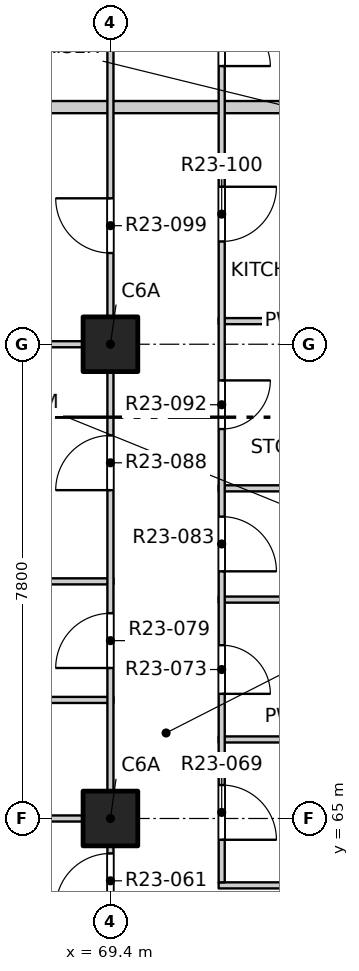
"""IFC4 building model, lengths in metres.
Left out: names, types, materials, properties, quantities, classifications, styles, units other than length and angle.
Written with IfcOpenShell. Run it as: python <this file> out.ifc"""

import sys

from ifc_helpers import new_model, si_unit, direction, frame, frame_2d, origin, origin_2d, place, context, subcontext, project, spatial, rectangle, extrude, element, fill, save


model = new_model("IFC4")
c1 = context("Model", 3, precision=1e-05, world=origin(), true_north=direction((0.0, 1.0)))
c2 = subcontext(c1, "Body", "Model", "MODEL_VIEW")
j1 = project(units=[si_unit("LENGTHUNIT", "METRE"), si_unit("PLANEANGLEUNIT", "RADIAN")], contexts=[c1])
p1 = place(None, origin())
s1 = spatial("IfcSite", under=j1, at=p1, CompositionType="ELEMENT")
p2 = place(p1, origin())
s2 = spatial("IfcBuilding", under=s1, at=p2, CompositionType="ELEMENT")
p3 = place(p2, frame((0.0, 0.0, 238.1)))
s3 = spatial("IfcBuildingStorey", under=s2, at=p3, CompositionType="ELEMENT", Elevation=238.1)
for number, where, z_axis, x_axis in (
    (1, (69.4, 65.0, -0.25), (0.0, 0.0, 1.0), (1.0, 0.0, 0.0)),
    (2, (69.4, 72.8, -0.25), (0.0, 0.0, 1.0), (1.0, 0.0, 0.0)),
):
    element("IfcColumn", number, at=place(p3, frame(where, z_axis=z_axis, x_axis=x_axis)), inside=s3, PredefinedType="COLUMN", context=c2, shape_type="SweptSolid", body=[
        extrude(rectangle(XDim=0.9, YDim=0.9, at=origin_2d()), origin(), (0.0, 0.0, 1.0), 3.35),
    ])
p4 = place(p3, frame((71.18, 63.9, 0.0), z_axis=(0.0, 0.0, 1.0), x_axis=(1.0, 0.0, 0.0)))
e3 = element("IfcWall", 3, at=p4, inside=s3, PredefinedType="PARTITIONING", context=c2, shape_type="SweptSolid", body=[
    extrude(rectangle(XDim=2.22, YDim=0.1, at=frame_2d((1.11, 0.0))), origin(), (0.0, 0.0, 1.0), 3.1),
])
p5 = place(p3, frame((61.9, 65.0, 0.0), z_axis=(0.0, 0.0, 1.0), x_axis=(1.0, 0.0, 0.0)))
e4 = element("IfcWall", 4, at=p5, inside=s3, PredefinedType="PARTITIONING", context=c2, shape_type="SweptSolid", body=[
    extrude(rectangle(XDim=7.55, YDim=0.1, at=frame_2d((3.775, 0.0))), origin(), (0.0, 0.0, 1.0), 3.1),
])
p6 = place(p3, frame((71.18, 66.3, 0.0), z_axis=(0.0, 0.0, 1.0), x_axis=(1.0, 0.0, 0.0)))
e5 = element("IfcWall", 5, at=p6, inside=s3, PredefinedType="PARTITIONING", context=c2, shape_type="SweptSolid", body=[
    extrude(rectangle(XDim=2.22, YDim=0.1, at=frame_2d((1.11, 0.0))), origin(), (0.0, 0.0, 1.0), 3.1),
])
p7 = place(p3, frame((65.75, 66.95, 0.0), z_axis=(0.0, 0.0, 1.0), x_axis=(1.0, 0.0, 0.0)))
e6 = element("IfcWall", 6, at=p7, inside=s3, PredefinedType="PARTITIONING", context=c2, shape_type="SweptSolid", body=[
    extrude(rectangle(XDim=3.7, YDim=0.1, at=frame_2d((1.85, 0.0))), origin(), (0.0, 0.0, 1.0), 3.1),
])
p8 = place(p3, frame((71.18, 68.6, 0.0), z_axis=(0.0, 0.0, 1.0), x_axis=(1.0, 0.0, 0.0)))
e7 = element("IfcWall", 7, at=p8, inside=s3, PredefinedType="PARTITIONING", context=c2, shape_type="SweptSolid", body=[
    extrude(rectangle(XDim=2.22, YDim=0.1, at=frame_2d((1.11, 0.0))), origin(), (0.0, 0.0, 1.0), 3.1),
])
p9 = place(p3, frame((61.9, 68.9, 0.0), z_axis=(0.0, 0.0, 1.0), x_axis=(1.0, 0.0, 0.0)))
e8 = element("IfcWall", 8, at=p9, inside=s3, PredefinedType="PARTITIONING", context=c2, shape_type="SweptSolid", body=[
    extrude(rectangle(XDim=7.55, YDim=0.1, at=frame_2d((3.775, 0.0))), origin(), (0.0, 0.0, 1.0), 3.1),
])
p10 = place(p3, frame((71.18, 70.43, 0.0), z_axis=(0.0, 0.0, 1.0), x_axis=(1.0, 0.0, 0.0)))
e9 = element("IfcWall", 9, at=p10, inside=s3, PredefinedType="PARTITIONING", context=c2, shape_type="SweptSolid", body=[
    extrude(rectangle(XDim=2.22, YDim=0.1, at=frame_2d((1.11, 0.0))), origin(), (0.0, 0.0, 1.0), 3.1),
])
p11 = place(p3, frame((61.9, 72.8, 0.0), z_axis=(0.0, 0.0, 1.0), x_axis=(1.0, 0.0, 0.0)))
e10 = element("IfcWall", 10, at=p11, inside=s3, PredefinedType="PARTITIONING", context=c2, shape_type="SweptSolid", body=[
    extrude(rectangle(XDim=7.55, YDim=0.1, at=frame_2d((3.775, 0.0))), origin(), (0.0, 0.0, 1.0), 3.1),
])
p12 = place(p3, frame((71.18, 73.18, 0.0), z_axis=(0.0, 0.0, 1.0), x_axis=(1.0, 0.0, 0.0)))
e11 = element("IfcWall", 11, at=p12, inside=s3, PredefinedType="PARTITIONING", context=c2, shape_type="SweptSolid", body=[
    extrude(rectangle(XDim=2.22, YDim=0.1, at=frame_2d((1.11, 0.0))), origin(), (0.0, 0.0, 1.0), 3.1),
])
p13 = place(p3, frame((61.9, 76.7, 0.0), z_axis=(0.0, 0.0, 1.0), x_axis=(1.0, 0.0, 0.0)))
e12 = element("IfcWall", 12, at=p13, inside=s3, PredefinedType="PARTITIONING", context=c2, shape_type="SweptSolid", body=[
    extrude(rectangle(XDim=11.5, YDim=0.2, at=frame_2d((5.75, 0.0))), origin(), (0.0, 0.0, 1.0), 3.1),
])
p14 = place(p3, frame((69.4, 41.9, 0.0), z_axis=(0.0, 0.0, 1.0), x_axis=(0.0, 1.0, 0.0)))
e13 = element("IfcWall", 13, at=p14, inside=s3, PredefinedType="PARTITIONING", context=c2, shape_type="SweptSolid", body=[
    extrude(rectangle(XDim=46.2, YDim=0.1, at=frame_2d((23.1, 0.0))), origin(), (0.0, 0.0, 1.0), 3.1),
])
p15 = place(p14, frame((1.2, 0.0, 0.0)))
e14 = element("IfcOpeningElement", 14, at=p15, cuts=e13, PredefinedType="OPENING", context=c2, shape_type="SweptSolid", body=[
    extrude(rectangle(XDim=0.9, YDim=2.1, at=frame_2d((0.45, 1.05))), frame((0.0, 0.06, 0.0), z_axis=(0.0, -1.0, 0.0), x_axis=(1.0, 0.0, 0.0)), (0.0, 0.0, 1.0), 0.12),
])
p16 = place(p14, frame((6.025, 0.0, 0.0)))
e15 = element("IfcOpeningElement", 15, at=p16, cuts=e13, PredefinedType="OPENING", context=c2, shape_type="SweptSolid", body=[
    extrude(rectangle(XDim=0.9, YDim=2.1, at=frame_2d((0.45, 1.05))), frame((0.0, 0.06, 0.0), z_axis=(0.0, -1.0, 0.0), x_axis=(1.0, 0.0, 0.0)), (0.0, 0.0, 1.0), 0.12),
])
p17 = place(p14, frame((9.975, 0.0, 0.0)))
e16 = element("IfcOpeningElement", 16, at=p17, cuts=e13, PredefinedType="OPENING", context=c2, shape_type="SweptSolid", body=[
    extrude(rectangle(XDim=0.9, YDim=2.1, at=frame_2d((0.45, 1.05))), frame((0.0, 0.06, 0.0), z_axis=(0.0, -1.0, 0.0), x_axis=(1.0, 0.0, 0.0)), (0.0, 0.0, 1.0), 0.12),
])
p18 = place(p14, frame((12.9, 0.0, 0.0)))
e17 = element("IfcOpeningElement", 17, at=p18, cuts=e13, PredefinedType="OPENING", context=c2, shape_type="SweptSolid", body=[
    extrude(rectangle(XDim=0.9, YDim=2.1, at=frame_2d((0.45, 1.05))), frame((0.0, 0.06, 0.0), z_axis=(0.0, -1.0, 0.0), x_axis=(1.0, 0.0, 0.0)), (0.0, 0.0, 1.0), 0.12),
])
p19 = place(p14, frame((17.775, 0.0, 0.0)))
e18 = element("IfcOpeningElement", 18, at=p19, cuts=e13, PredefinedType="OPENING", context=c2, shape_type="SweptSolid", body=[
    extrude(rectangle(XDim=0.9, YDim=2.1, at=frame_2d((0.45, 1.05))), frame((0.0, 0.06, 0.0), z_axis=(0.0, -1.0, 0.0), x_axis=(1.0, 0.0, 0.0)), (0.0, 0.0, 1.0), 0.12),
])
p20 = place(p14, frame((21.625, 0.0, 0.0)))
e19 = element("IfcOpeningElement", 19, at=p20, cuts=e13, PredefinedType="OPENING", context=c2, shape_type="SweptSolid", body=[
    extrude(rectangle(XDim=0.9, YDim=2.1, at=frame_2d((0.45, 1.05))), frame((0.0, 0.06, 0.0), z_axis=(0.0, -1.0, 0.0), x_axis=(1.0, 0.0, 0.0)), (0.0, 0.0, 1.0), 0.12),
])
p21 = place(p14, frame((25.575, 0.0, 0.0)))
e20 = element("IfcOpeningElement", 20, at=p21, cuts=e13, PredefinedType="OPENING", context=c2, shape_type="SweptSolid", body=[
    extrude(rectangle(XDim=0.9, YDim=2.1, at=frame_2d((0.45, 1.05))), frame((0.0, 0.06, 0.0), z_axis=(0.0, -1.0, 0.0), x_axis=(1.0, 0.0, 0.0)), (0.0, 0.0, 1.0), 0.12),
])
p22 = place(p14, frame((28.5, 0.0, 0.0)))
e21 = element("IfcOpeningElement", 21, at=p22, cuts=e13, PredefinedType="OPENING", context=c2, shape_type="SweptSolid", body=[
    extrude(rectangle(XDim=0.9, YDim=2.1, at=frame_2d((0.45, 1.05))), frame((0.0, 0.06, 0.0), z_axis=(0.0, -1.0, 0.0), x_axis=(1.0, 0.0, 0.0)), (0.0, 0.0, 1.0), 0.12),
])
p23 = place(p14, frame((32.4, 0.0, 0.0)))
e22 = element("IfcOpeningElement", 22, at=p23, cuts=e13, PredefinedType="OPENING", context=c2, shape_type="SweptSolid", body=[
    extrude(rectangle(XDim=0.9, YDim=2.1, at=frame_2d((0.45, 1.05))), frame((0.0, 0.06, 0.0), z_axis=(0.0, -1.0, 0.0), x_axis=(1.0, 0.0, 0.0)), (0.0, 0.0, 1.0), 0.12),
])
p24 = place(p14, frame((36.3, 0.0, 0.0)))
e23 = element("IfcOpeningElement", 23, at=p24, cuts=e13, PredefinedType="OPENING", context=c2, shape_type="SweptSolid", body=[
    extrude(rectangle(XDim=0.9, YDim=2.1, at=frame_2d((0.45, 1.05))), frame((0.0, 0.06, 0.0), z_axis=(0.0, -1.0, 0.0), x_axis=(1.0, 0.0, 0.0)), (0.0, 0.0, 1.0), 0.12),
])
p25 = place(p14, frame((40.2, 0.0, 0.0)))
e24 = element("IfcOpeningElement", 24, at=p25, cuts=e13, PredefinedType="OPENING", context=c2, shape_type="SweptSolid", body=[
    extrude(rectangle(XDim=0.9, YDim=2.1, at=frame_2d((0.45, 1.05))), frame((0.0, 0.06, 0.0), z_axis=(0.0, -1.0, 0.0), x_axis=(1.0, 0.0, 0.0)), (0.0, 0.0, 1.0), 0.12),
])
p26 = place(p14, frame((44.1, 0.0, 0.0)))
e25 = element("IfcOpeningElement", 25, at=p26, cuts=e13, PredefinedType="OPENING", context=c2, shape_type="SweptSolid", body=[
    extrude(rectangle(XDim=0.9, YDim=2.1, at=frame_2d((0.45, 1.05))), frame((0.0, 0.06, 0.0), z_axis=(0.0, -1.0, 0.0), x_axis=(1.0, 0.0, 0.0)), (0.0, 0.0, 1.0), 0.12),
])
p27 = place(p3, frame((71.23, 63.95, 0.0), z_axis=(0.0, 0.0, 1.0), x_axis=(0.0, 1.0, 0.0)))
e26 = element("IfcWall", 26, at=p27, inside=s3, PredefinedType="PARTITIONING", context=c2, shape_type="SweptSolid", body=[
    extrude(rectangle(XDim=17.85, YDim=0.1, at=frame_2d((8.925, 0.0))), origin(), (0.0, 0.0, 1.0), 3.1),
])
p28 = place(p27, frame((0.7, 0.0, 0.0)))
e27 = element("IfcOpeningElement", 27, at=p28, cuts=e26, PredefinedType="OPENING", context=c2, shape_type="SweptSolid", body=[
    extrude(rectangle(XDim=0.9, YDim=2.1, at=frame_2d((0.45, 1.05))), frame((0.0, 0.06, 0.0), z_axis=(0.0, -1.0, 0.0), x_axis=(1.0, 0.0, 0.0)), (0.0, 0.0, 1.0), 0.12),
])
p29 = place(p27, frame((3.1, 0.0, 0.0)))
e28 = element("IfcOpeningElement", 28, at=p29, cuts=e26, PredefinedType="OPENING", context=c2, shape_type="SweptSolid", body=[
    extrude(rectangle(XDim=0.8, YDim=2.1, at=frame_2d((0.4, 1.05))), frame((0.0, 0.06, 0.0), z_axis=(0.0, -1.0, 0.0), x_axis=(1.0, 0.0, 0.0)), (0.0, 0.0, 1.0), 0.12),
])
p30 = place(p27, frame((5.115, 0.0, 0.0)))
e29 = element("IfcOpeningElement", 29, at=p30, cuts=e26, PredefinedType="OPENING", context=c2, shape_type="SweptSolid", body=[
    extrude(rectangle(XDim=0.9, YDim=2.1, at=frame_2d((0.45, 1.05))), frame((0.0, 0.06, 0.0), z_axis=(0.0, -1.0, 0.0), x_axis=(1.0, 0.0, 0.0)), (0.0, 0.0, 1.0), 0.12),
])
p31 = place(p27, frame((7.455, 0.0, 0.0)))
e30 = element("IfcOpeningElement", 30, at=p31, cuts=e26, PredefinedType="OPENING", context=c2, shape_type="SweptSolid", body=[
    extrude(rectangle(XDim=0.8, YDim=2.1, at=frame_2d((0.4, 1.05))), frame((0.0, 0.06, 0.0), z_axis=(0.0, -1.0, 0.0), x_axis=(1.0, 0.0, 0.0)), (0.0, 0.0, 1.0), 0.12),
])
p32 = place(p27, frame((10.54, 0.0, 0.0)))
e31 = element("IfcOpeningElement", 31, at=p32, cuts=e26, PredefinedType="OPENING", context=c2, shape_type="SweptSolid", body=[
    extrude(rectangle(XDim=0.9, YDim=2.1, at=frame_2d((0.45, 1.05))), frame((0.0, 0.06, 0.0), z_axis=(0.0, -1.0, 0.0), x_axis=(1.0, 0.0, 0.0)), (0.0, 0.0, 1.0), 0.12),
])
p33 = place(p27, frame((13.425, 0.0, 0.0)))
e32 = element("IfcOpeningElement", 32, at=p33, cuts=e26, PredefinedType="OPENING", context=c2, shape_type="SweptSolid", body=[
    extrude(rectangle(XDim=0.8, YDim=2.1, at=frame_2d((0.4, 1.05))), frame((0.0, 0.06, 0.0), z_axis=(0.0, -1.0, 0.0), x_axis=(1.0, 0.0, 0.0)), (0.0, 0.0, 1.0), 0.12),
])
p34 = place(p27, frame((15.95, 0.0, 0.0)))
e33 = element("IfcOpeningElement", 33, at=p34, cuts=e26, PredefinedType="OPENING", context=c2, shape_type="SweptSolid", body=[
    extrude(rectangle(XDim=0.9, YDim=2.1, at=frame_2d((0.45, 1.05))), frame((0.0, 0.06, 0.0), z_axis=(0.0, -1.0, 0.0), x_axis=(1.0, 0.0, 0.0)), (0.0, 0.0, 1.0), 0.12),
])
p35 = place(p20, origin())
e34 = element("IfcDoor", 34, at=p35, inside=s3, OperationType="SINGLE_SWING_LEFT", PredefinedType="DOOR", context=c2, shape_type="SweptSolid", body=[
    extrude(rectangle(XDim=0.9, YDim=2.1, at=frame_2d((0.45, 1.05))), frame((0.0, 0.025, 0.0), z_axis=(0.0, -1.0, 0.0), x_axis=(1.0, 0.0, 0.0)), (0.0, 0.0, 1.0), 0.05),
])
fill(e19, e34)
p36 = place(p28, origin())
e35 = element("IfcDoor", 35, at=p36, inside=s3, OperationType="SINGLE_SWING_RIGHT", PredefinedType="DOOR", context=c2, shape_type="SweptSolid", body=[
    extrude(rectangle(XDim=0.9, YDim=2.1, at=frame_2d((0.45, 1.05))), frame((0.0, 0.025, 0.0), z_axis=(0.0, -1.0, 0.0), x_axis=(1.0, 0.0, 0.0)), (0.0, 0.0, 1.0), 0.05),
])
fill(e27, e35)
p37 = place(p29, origin())
e36 = element("IfcDoor", 36, at=p37, inside=s3, OperationType="SINGLE_SWING_RIGHT", PredefinedType="DOOR", context=c2, shape_type="SweptSolid", body=[
    extrude(rectangle(XDim=0.8, YDim=2.1, at=frame_2d((0.4, 1.05))), frame((0.0, 0.025, 0.0), z_axis=(0.0, -1.0, 0.0), x_axis=(1.0, 0.0, 0.0)), (0.0, 0.0, 1.0), 0.05),
])
fill(e28, e36)
p38 = place(p21, origin())
e37 = element("IfcDoor", 37, at=p38, inside=s3, OperationType="SINGLE_SWING_LEFT", PredefinedType="DOOR", context=c2, shape_type="SweptSolid", body=[
    extrude(rectangle(XDim=0.9, YDim=2.1, at=frame_2d((0.45, 1.05))), frame((0.0, 0.025, 0.0), z_axis=(0.0, -1.0, 0.0), x_axis=(1.0, 0.0, 0.0)), (0.0, 0.0, 1.0), 0.05),
])
fill(e20, e37)
p39 = place(p30, origin())
e38 = element("IfcDoor", 38, at=p39, inside=s3, OperationType="SINGLE_SWING_RIGHT", PredefinedType="DOOR", context=c2, shape_type="SweptSolid", body=[
    extrude(rectangle(XDim=0.9, YDim=2.1, at=frame_2d((0.45, 1.05))), frame((0.0, 0.025, 0.0), z_axis=(0.0, -1.0, 0.0), x_axis=(1.0, 0.0, 0.0)), (0.0, 0.0, 1.0), 0.05),
])
fill(e29, e38)
p40 = place(p22, origin())
e39 = element("IfcDoor", 39, at=p40, inside=s3, OperationType="SINGLE_SWING_LEFT", PredefinedType="DOOR", context=c2, shape_type="SweptSolid", body=[
    extrude(rectangle(XDim=0.9, YDim=2.1, at=frame_2d((0.45, 1.05))), frame((0.0, 0.025, 0.0), z_axis=(0.0, -1.0, 0.0), x_axis=(1.0, 0.0, 0.0)), (0.0, 0.0, 1.0), 0.05),
])
fill(e21, e39)
p41 = place(p31, origin())
e40 = element("IfcDoor", 40, at=p41, inside=s3, OperationType="SINGLE_SWING_LEFT", PredefinedType="DOOR", context=c2, shape_type="SweptSolid", body=[
    extrude(rectangle(XDim=0.8, YDim=2.1, at=frame_2d((0.4, 1.05))), frame((0.0, 0.025, 0.0), z_axis=(0.0, -1.0, 0.0), x_axis=(1.0, 0.0, 0.0)), (0.0, 0.0, 1.0), 0.05),
])
fill(e30, e40)
p42 = place(p23, origin())
e41 = element("IfcDoor", 41, at=p42, inside=s3, OperationType="SINGLE_SWING_RIGHT", PredefinedType="DOOR", context=c2, shape_type="SweptSolid", body=[
    extrude(rectangle(XDim=0.9, YDim=2.1, at=frame_2d((0.45, 1.05))), frame((0.0, 0.025, 0.0), z_axis=(0.0, -1.0, 0.0), x_axis=(1.0, 0.0, 0.0)), (0.0, 0.0, 1.0), 0.05),
])
fill(e22, e41)
p43 = place(p32, origin())
e42 = element("IfcDoor", 42, at=p43, inside=s3, OperationType="SINGLE_SWING_LEFT", PredefinedType="DOOR", context=c2, shape_type="SweptSolid", body=[
    extrude(rectangle(XDim=0.9, YDim=2.1, at=frame_2d((0.45, 1.05))), frame((0.0, 0.025, 0.0), z_axis=(0.0, -1.0, 0.0), x_axis=(1.0, 0.0, 0.0)), (0.0, 0.0, 1.0), 0.05),
])
fill(e31, e42)
p44 = place(p33, origin())
e43 = element("IfcDoor", 43, at=p44, inside=s3, OperationType="SINGLE_SWING_RIGHT", PredefinedType="DOOR", context=c2, shape_type="SweptSolid", body=[
    extrude(rectangle(XDim=0.8, YDim=2.1, at=frame_2d((0.4, 1.05))), frame((0.0, 0.025, 0.0), z_axis=(0.0, -1.0, 0.0), x_axis=(1.0, 0.0, 0.0)), (0.0, 0.0, 1.0), 0.05),
])
fill(e32, e43)
save(model, sys.argv[1])
